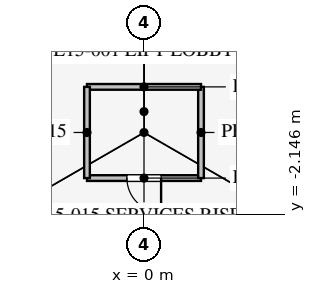
"""IFC4 building model, lengths in metres.
Left out: names, types, materials, properties, quantities, classifications, styles, units other than length and angle.
Written with IfcOpenShell. Run it as: python <this file> out.ifc"""

import sys

from ifc_helpers import new_model, si_unit, direction, frame, frame_2d, origin, place, context, subcontext, project, spatial, rectangle, extrude, element, fill, save


model = new_model("IFC4")
c1 = context("Model", 3, precision=1e-05, world=origin(), true_north=direction((0.0, 1.0)))
c2 = subcontext(c1, "Body", "Model", "MODEL_VIEW")
j1 = project(units=[si_unit("LENGTHUNIT", "METRE"), si_unit("PLANEANGLEUNIT", "RADIAN")], contexts=[c1])
p1 = place(None, origin())
s1 = spatial("IfcSite", under=j1, at=p1, CompositionType="ELEMENT")
p2 = place(p1, origin())
s2 = spatial("IfcBuilding", under=s1, at=p2, CompositionType="ELEMENT")
p3 = place(p2, frame((0.0, 0.0, 66.9)))
s3 = spatial("IfcBuildingStorey", under=s2, at=p3, CompositionType="ELEMENT", Elevation=66.9)
p4 = place(p3, frame((-1.5, -1.2, 0.0), z_axis=(0.0, 0.0, 1.0), x_axis=(1.0, 0.0, 0.0)))
e1 = element("IfcWall", 1, at=p4, inside=s3, PredefinedType="PARTITIONING", context=c2, shape_type="SweptSolid", body=[
    extrude(rectangle(XDim=3.0, YDim=0.15, at=frame_2d((1.5, 0.0))), origin(), (0.0, 0.0, 1.0), 4.0),
])
p5 = place(p4, frame((1.05, 0.0, 0.0)))
e2 = element("IfcOpeningElement", 2, at=p5, cuts=e1, PredefinedType="OPENING", context=c2, shape_type="SweptSolid", body=[
    extrude(rectangle(XDim=0.9, YDim=2.1, at=frame_2d((0.45, 1.05))), frame((0.0, 0.085, 0.0), z_axis=(0.0, -1.0, 0.0), x_axis=(1.0, 0.0, 0.0)), (0.0, 0.0, 1.0), 0.17),
])
p6 = place(p3, frame((1.5, -1.2, 0.0), z_axis=(0.0, 0.0, 1.0), x_axis=(0.0, 1.0, 0.0)))
e3 = element("IfcWall", 3, at=p6, inside=s3, PredefinedType="PARTITIONING", context=c2, shape_type="SweptSolid", body=[
    extrude(rectangle(XDim=2.4, YDim=0.15, at=frame_2d((1.2, 0.0))), origin(), (0.0, 0.0, 1.0), 4.0),
])
p7 = place(p3, frame((1.5, 1.2, 0.0), z_axis=(0.0, 0.0, 1.0), x_axis=(-1.0, 0.0, 0.0)))
e4 = element("IfcWall", 4, at=p7, inside=s3, PredefinedType="PARTITIONING", context=c2, shape_type="SweptSolid", body=[
    extrude(rectangle(XDim=3.0, YDim=0.15, at=frame_2d((1.5, 0.0))), origin(), (0.0, 0.0, 1.0), 4.0),
])
p8 = place(p3, frame((-1.5, 1.2, 0.0), z_axis=(0.0, 0.0, 1.0), x_axis=(0.0, -1.0, 0.0)))
e5 = element("IfcWall", 5, at=p8, inside=s3, PredefinedType="PARTITIONING", context=c2, shape_type="SweptSolid", body=[
    extrude(rectangle(XDim=2.4, YDim=0.15, at=frame_2d((1.2, 0.0))), origin(), (0.0, 0.0, 1.0), 4.0),
])
p9 = place(p3, frame((26.415, -15.231, 0.0), z_axis=(0.0, 0.0, 1.0), x_axis=(-0.50000091641, 0.866024874695, 0.0)))
e6 = element("IfcWall", 6, at=p9, inside=s3, PredefinedType="PARTITIONING", context=c2, shape_type="SweptSolid", body=[
    extrude(rectangle(XDim=52.796, YDim=0.12, at=frame_2d((26.398, 0.0))), origin(), (0.0, 0.0, 1.0), 2.9),
])
p10 = place(p9, frame((10.2, 0.0, 0.15)))
e7 = element("IfcOpeningElement", 7, at=p10, cuts=e6, PredefinedType="OPENING", context=c2, shape_type="SweptSolid", body=[
    extrude(rectangle(XDim=1.8, YDim=2.1, at=frame_2d((0.9, 1.05))), frame((0.0, 0.07, 0.0), z_axis=(0.0, -1.0, 0.0), x_axis=(1.0, 0.0, 0.0)), (0.0, 0.0, 1.0), 0.14),
])
p11 = place(p9, frame((40.8, 0.0, 0.15)))
e8 = element("IfcOpeningElement", 8, at=p11, cuts=e6, PredefinedType="OPENING", context=c2, shape_type="SweptSolid", body=[
    extrude(rectangle(XDim=1.8, YDim=2.1, at=frame_2d((0.9, 1.05))), frame((0.0, 0.07, 0.0), z_axis=(0.0, -1.0, 0.0), x_axis=(1.0, 0.0, 0.0)), (0.0, 0.0, 1.0), 0.14),
])
p12 = place(p5, frame((0.9, 0.0, 0.0), z_axis=(0.0, 0.0, 1.0), x_axis=(-1.0, 0.0, 0.0)))
e9 = element("IfcDoor", 9, at=p12, inside=s3, OperationType="SINGLE_SWING_LEFT", PredefinedType="DOOR", context=c2, shape_type="SweptSolid", body=[
    extrude(rectangle(XDim=0.9, YDim=2.1, at=frame_2d((0.45, 1.05))), frame((0.0, 0.025, 0.0), z_axis=(0.0, -1.0, 0.0), x_axis=(1.0, 0.0, 0.0)), (0.0, 0.0, 1.0), 0.05),
])
fill(e2, e9)
save(model, sys.argv[1])
